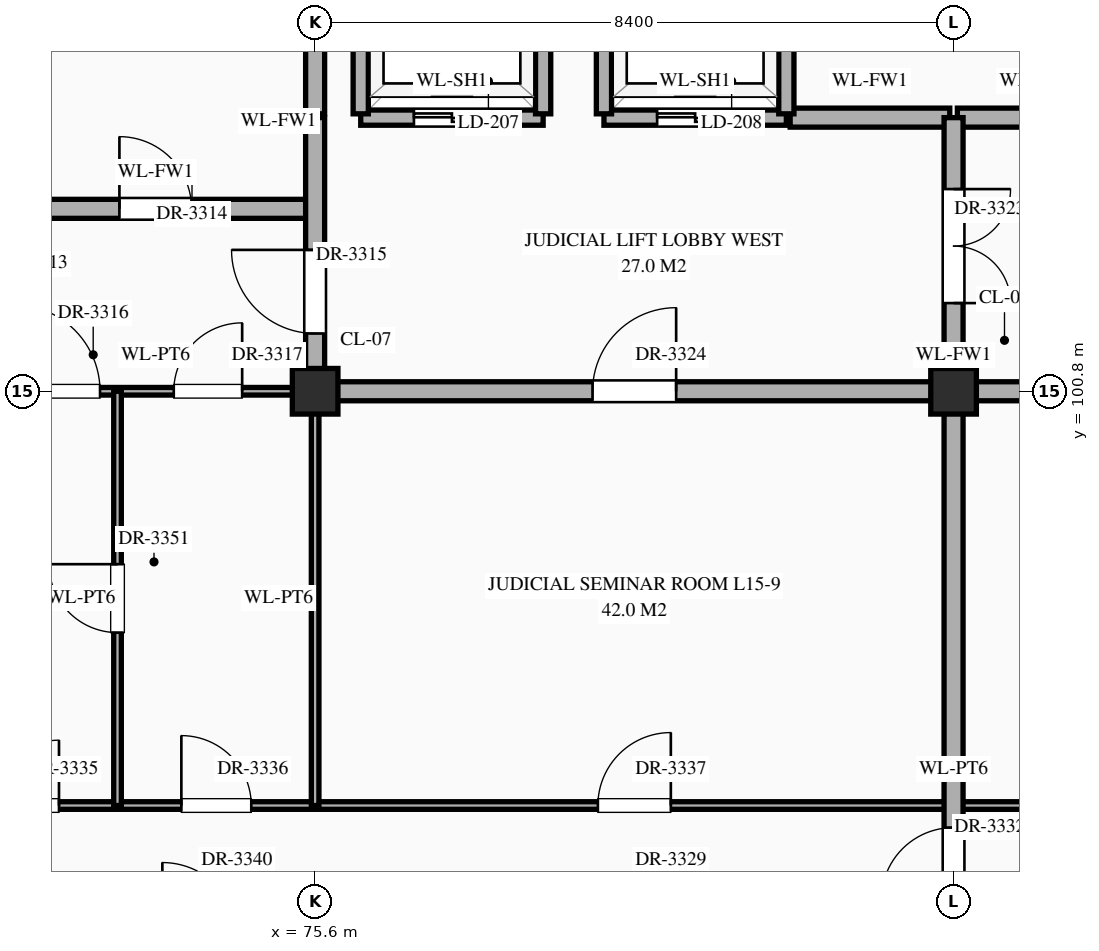
"""IFC4 building model, lengths in metres.
Left out: names, types, materials, properties, quantities, classifications, styles, units other than length and angle.
Written with IfcOpenShell. Run it as: python <this file> out.ifc"""

import sys

from ifc_helpers import new_model, si_unit, direction, frame, frame_2d, origin, origin_2d, place, context, subcontext, project, spatial, rectangle, extrude, element, fill, save


model = new_model("IFC4")
c1 = context("Model", 3, precision=1e-05, world=origin(), true_north=direction((0.0, 1.0)))
c2 = subcontext(c1, "Body", "Model", "MODEL_VIEW")
j1 = project(units=[si_unit("LENGTHUNIT", "METRE"), si_unit("PLANEANGLEUNIT", "RADIAN")], contexts=[c1])
p1 = place(None, origin())
s1 = spatial("IfcSite", under=j1, at=p1, CompositionType="ELEMENT")
p2 = place(p1, origin())
s2 = spatial("IfcBuilding", under=s1, at=p2, CompositionType="ELEMENT")
p3 = place(p2, frame((0.0, 0.0, 64.5)))
s3 = spatial("IfcBuildingStorey", under=s2, at=p3, CompositionType="ELEMENT", Elevation=64.5)
for number, where, z_axis, x_axis in (
    (1, (75.6, 100.8, 0.0), (0.0, 0.0, 1.0), (1.0, 0.0, 0.0)),
    (2, (84.0, 100.8, 0.0), (0.0, 0.0, 1.0), (1.0, 0.0, 0.0)),
):
    element("IfcColumn", number, at=place(p3, frame(where, z_axis=z_axis, x_axis=x_axis)), inside=s3, PredefinedType="COLUMN", context=c2, shape_type="SweptSolid", body=[
        extrude(rectangle(XDim=0.6, YDim=0.6, at=origin_2d()), origin(), (0.0, 0.0, 1.0), 4.2),
    ])
p4 = place(p3, frame((58.84, 95.35, 0.0), z_axis=(0.0, 0.0, 1.0), x_axis=(1.0, 0.0, 0.0)))
e3 = element("IfcWall", 3, at=p4, inside=s3, PredefinedType="STANDARD", context=c2, shape_type="SweptSolid", body=[
    extrude(rectangle(XDim=50.32, YDim=0.1, at=frame_2d((25.16, 0.0))), origin(), (0.0, 0.0, 1.0), 3.95),
])
p5 = place(p4, frame((3.61, 0.0, 0.0)))
e4 = element("IfcOpeningElement", 4, at=p5, cuts=e3, PredefinedType="OPENING", context=c2, shape_type="SweptSolid", body=[
    extrude(rectangle(XDim=1.14, YDim=2.4, at=frame_2d((0.57, 1.2))), frame((0.0, 0.062, 0.0), z_axis=(0.0, -1.0, 0.0), x_axis=(1.0, 0.0, 0.0)), (0.0, 0.0, 1.0), 0.124),
])
p6 = place(p4, frame((9.61, 0.0, 0.0)))
e5 = element("IfcOpeningElement", 5, at=p6, cuts=e3, PredefinedType="OPENING", context=c2, shape_type="SweptSolid", body=[
    extrude(rectangle(XDim=0.9, YDim=2.15, at=frame_2d((0.45, 1.075))), frame((0.0, 0.062, 0.0), z_axis=(0.0, -1.0, 0.0), x_axis=(1.0, 0.0, 0.0)), (0.0, 0.0, 1.0), 0.124),
])
p7 = place(p4, frame((12.53, 0.0, 0.0)))
e6 = element("IfcOpeningElement", 6, at=p7, cuts=e3, PredefinedType="OPENING", context=c2, shape_type="SweptSolid", body=[
    extrude(rectangle(XDim=0.86, YDim=2.1, at=frame_2d((0.43, 1.05))), frame((0.0, 0.062, 0.0), z_axis=(0.0, -1.0, 0.0), x_axis=(1.0, 0.0, 0.0)), (0.0, 0.0, 1.0), 0.124),
])
p8 = place(p4, frame((15.0, 0.0, 0.0)))
e7 = element("IfcOpeningElement", 7, at=p8, cuts=e3, PredefinedType="OPENING", context=c2, shape_type="SweptSolid", body=[
    extrude(rectangle(XDim=0.92, YDim=2.15, at=frame_2d((0.46, 1.075))), frame((0.0, 0.062, 0.0), z_axis=(0.0, -1.0, 0.0), x_axis=(1.0, 0.0, 0.0)), (0.0, 0.0, 1.0), 0.124),
])
p9 = place(p4, frame((20.48, 0.0, 0.0)))
e8 = element("IfcOpeningElement", 8, at=p9, cuts=e3, PredefinedType="OPENING", context=c2, shape_type="SweptSolid", body=[
    extrude(rectangle(XDim=0.96, YDim=2.2, at=frame_2d((0.48, 1.1))), frame((0.0, 0.062, 0.0), z_axis=(0.0, -1.0, 0.0), x_axis=(1.0, 0.0, 0.0)), (0.0, 0.0, 1.0), 0.124),
])
p10 = place(p4, frame((28.8, 0.0, 0.0)))
e9 = element("IfcOpeningElement", 9, at=p10, cuts=e3, PredefinedType="OPENING", context=c2, shape_type="SweptSolid", body=[
    extrude(rectangle(XDim=1.12, YDim=2.25, at=frame_2d((0.56, 1.125))), frame((0.0, 0.062, 0.0), z_axis=(0.0, -1.0, 0.0), x_axis=(1.0, 0.0, 0.0)), (0.0, 0.0, 1.0), 0.124),
])
p11 = place(p4, frame((34.68, 0.0, 0.0)))
e10 = element("IfcOpeningElement", 10, at=p11, cuts=e3, PredefinedType="OPENING", context=c2, shape_type="SweptSolid", body=[
    extrude(rectangle(XDim=1.16, YDim=2.3, at=frame_2d((0.58, 1.15))), frame((0.0, 0.062, 0.0), z_axis=(0.0, -1.0, 0.0), x_axis=(1.0, 0.0, 0.0)), (0.0, 0.0, 1.0), 0.124),
])
p12 = place(p4, frame((37.56, 0.0, 0.0)))
e11 = element("IfcOpeningElement", 11, at=p12, cuts=e3, PredefinedType="OPENING", context=c2, shape_type="SweptSolid", body=[
    extrude(rectangle(XDim=1.2, YDim=2.35, at=frame_2d((0.6, 1.175))), frame((0.0, 0.062, 0.0), z_axis=(0.0, -1.0, 0.0), x_axis=(1.0, 0.0, 0.0)), (0.0, 0.0, 1.0), 0.124),
])
p13 = place(p4, frame((40.04, 0.0, 0.0)))
e12 = element("IfcOpeningElement", 12, at=p13, cuts=e3, PredefinedType="OPENING", context=c2, shape_type="SweptSolid", body=[
    extrude(rectangle(XDim=1.24, YDim=2.3, at=frame_2d((0.62, 1.15))), frame((0.0, 0.062, 0.0), z_axis=(0.0, -1.0, 0.0), x_axis=(1.0, 0.0, 0.0)), (0.0, 0.0, 1.0), 0.124),
])
p14 = place(p4, frame((45.5, 0.0, 0.0)))
e13 = element("IfcOpeningElement", 13, at=p14, cuts=e3, PredefinedType="OPENING", context=c2, shape_type="SweptSolid", body=[
    extrude(rectangle(XDim=1.28, YDim=2.35, at=frame_2d((0.64, 1.175))), frame((0.0, 0.062, 0.0), z_axis=(0.0, -1.0, 0.0), x_axis=(1.0, 0.0, 0.0)), (0.0, 0.0, 1.0), 0.124),
])
p15 = place(p3, frame((71.4, 100.8, 0.0), z_axis=(0.0, 0.0, 1.0), x_axis=(1.0, 0.0, 0.0)))
e14 = element("IfcWall", 14, at=p15, inside=s3, PredefinedType="STANDARD", context=c2, shape_type="SweptSolid", body=[
    extrude(rectangle(XDim=4.2, YDim=0.1, at=frame_2d((2.1, 0.0))), origin(), (0.0, 0.0, 1.0), 3.1),
])
p16 = place(p15, frame((0.23, 0.0, 0.0)))
e15 = element("IfcOpeningElement", 15, at=p16, cuts=e14, PredefinedType="OPENING", context=c2, shape_type="SweptSolid", body=[
    extrude(rectangle(XDim=1.14, YDim=2.4, at=frame_2d((0.57, 1.2))), frame((0.0, 0.062, 0.0), z_axis=(0.0, -1.0, 0.0), x_axis=(1.0, 0.0, 0.0)), (0.0, 0.0, 1.0), 0.124),
])
p17 = place(p15, frame((2.34, 0.0, 0.0)))
e16 = element("IfcOpeningElement", 16, at=p17, cuts=e14, PredefinedType="OPENING", context=c2, shape_type="SweptSolid", body=[
    extrude(rectangle(XDim=0.9, YDim=2.15, at=frame_2d((0.45, 1.075))), frame((0.0, 0.062, 0.0), z_axis=(0.0, -1.0, 0.0), x_axis=(1.0, 0.0, 0.0)), (0.0, 0.0, 1.0), 0.124),
])
p18 = place(p3, frame((75.6, 100.8, 0.0), z_axis=(0.0, 0.0, 1.0), x_axis=(1.0, 0.0, 0.0)))
e17 = element("IfcWall", 17, at=p18, inside=s3, PredefinedType="STANDARD", context=c2, shape_type="SweptSolid", body=[
    extrude(rectangle(XDim=16.8, YDim=0.25, at=frame_2d((8.4, 0.0))), origin(), (0.0, 0.0, 1.0), 3.1),
])
p19 = place(p18, frame((3.65, 0.0, 0.0)))
e18 = element("IfcOpeningElement", 18, at=p19, cuts=e17, PredefinedType="OPENING", context=c2, shape_type="SweptSolid", body=[
    extrude(rectangle(XDim=1.1, YDim=2.2, at=frame_2d((0.55, 1.1))), frame((0.0, 0.137, 0.0), z_axis=(0.0, -1.0, 0.0), x_axis=(1.0, 0.0, 0.0)), (0.0, 0.0, 1.0), 0.274),
])
p20 = place(p18, frame((12.1, 0.0, 0.0)))
e19 = element("IfcOpeningElement", 19, at=p20, cuts=e17, PredefinedType="OPENING", context=c2, shape_type="SweptSolid", body=[
    extrude(rectangle(XDim=1.0, YDim=2.2, at=frame_2d((0.5, 1.1))), frame((0.0, 0.137, 0.0), z_axis=(0.0, -1.0, 0.0), x_axis=(1.0, 0.0, 0.0)), (0.0, 0.0, 1.0), 0.274),
])
p21 = place(p3, frame((71.4, 103.2, 0.0), z_axis=(0.0, 0.0, 1.0), x_axis=(1.0, 0.0, 0.0)))
e20 = element("IfcWall", 20, at=p21, inside=s3, PredefinedType="STANDARD", context=c2, shape_type="SweptSolid", body=[
    extrude(rectangle(XDim=4.2, YDim=0.25, at=frame_2d((2.1, 0.0))), origin(), (0.0, 0.0, 1.0), 3.95),
])
p22 = place(p21, frame((1.625, 0.0, 0.0)))
e21 = element("IfcOpeningElement", 21, at=p22, cuts=e20, PredefinedType="OPENING", context=c2, shape_type="SweptSolid", body=[
    extrude(rectangle(XDim=0.95, YDim=2.15, at=frame_2d((0.475, 1.075))), frame((0.0, 0.137, 0.0), z_axis=(0.0, -1.0, 0.0), x_axis=(1.0, 0.0, 0.0)), (0.0, 0.0, 1.0), 0.274),
])
p23 = place(p3, frame((76.2, 104.4, 0.0), z_axis=(0.0, 0.0, 1.0), x_axis=(1.0, 0.0, 0.0)))
e22 = element("IfcWall", 22, at=p23, inside=s3, PredefinedType="STANDARD", context=c2, shape_type="SweptSolid", body=[
    extrude(rectangle(XDim=2.4, YDim=0.2, at=frame_2d((1.2, 0.0))), origin(), (0.0, 0.0, 1.0), 3.95),
])
p24 = place(p23, frame((0.7, 0.0, 0.0)))
e23 = element("IfcOpeningElement", 23, at=p24, cuts=e22, PredefinedType="OPENING", context=c2, shape_type="SweptSolid", body=[
    extrude(rectangle(XDim=1.0, YDim=2.15, at=frame_2d((0.5, 1.075))), frame((0.0, 0.112, 0.0), z_axis=(0.0, -1.0, 0.0), x_axis=(1.0, 0.0, 0.0)), (0.0, 0.0, 1.0), 0.224),
])
p25 = place(p3, frame((79.4, 104.4, 0.0), z_axis=(0.0, 0.0, 1.0), x_axis=(1.0, 0.0, 0.0)))
e24 = element("IfcWall", 24, at=p25, inside=s3, PredefinedType="STANDARD", context=c2, shape_type="SweptSolid", body=[
    extrude(rectangle(XDim=2.4, YDim=0.2, at=frame_2d((1.2, 0.0))), origin(), (0.0, 0.0, 1.0), 3.95),
])
p26 = place(p25, frame((0.7, 0.0, 0.0)))
e25 = element("IfcOpeningElement", 25, at=p26, cuts=e24, PredefinedType="OPENING", context=c2, shape_type="SweptSolid", body=[
    extrude(rectangle(XDim=1.0, YDim=2.15, at=frame_2d((0.5, 1.075))), frame((0.0, 0.112, 0.0), z_axis=(0.0, -1.0, 0.0), x_axis=(1.0, 0.0, 0.0)), (0.0, 0.0, 1.0), 0.224),
])
for number, where, z_axis, x_axis in (
    (26, (81.85, 104.4, 0.0), (0.0, 0.0, 1.0), (1.0, 0.0, 0.0)),
    (27, (84.05, 104.4, 0.0), (0.0, 0.0, 1.0), (1.0, 0.0, 0.0)),
):
    element("IfcWall", number, at=place(p3, frame(where, z_axis=z_axis, x_axis=x_axis)), inside=s3, PredefinedType="STANDARD", context=c2, shape_type="SweptSolid", body=[
        extrude(rectangle(XDim=2.1, YDim=0.25, at=frame_2d((1.05, 0.0))), origin(), (0.0, 0.0, 1.0), 3.95),
    ])
p27 = place(p3, frame((73.0, 95.35, 0.0), z_axis=(0.0, 0.0, 1.0), x_axis=(0.0, 1.0, 0.0)))
e28 = element("IfcWall", 28, at=p27, inside=s3, PredefinedType="STANDARD", context=c2, shape_type="SweptSolid", body=[
    extrude(rectangle(XDim=5.45, YDim=0.1, at=frame_2d((2.725, 0.0))), origin(), (0.0, 0.0, 1.0), 3.95),
])
p28 = place(p27, frame((2.275, 0.0, 0.0)))
e29 = element("IfcOpeningElement", 29, at=p28, cuts=e28, PredefinedType="OPENING", context=c2, shape_type="SweptSolid", body=[
    extrude(rectangle(XDim=0.9, YDim=2.15, at=frame_2d((0.45, 1.075))), frame((0.0, 0.062, 0.0), z_axis=(0.0, -1.0, 0.0), x_axis=(1.0, 0.0, 0.0)), (0.0, 0.0, 1.0), 0.124),
])
p29 = place(p3, frame((75.6, 95.35, 0.0), z_axis=(0.0, 0.0, 1.0), x_axis=(0.0, 1.0, 0.0)))
e30 = element("IfcWall", 30, at=p29, inside=s3, PredefinedType="STANDARD", context=c2, shape_type="SweptSolid", body=[
    extrude(rectangle(XDim=5.45, YDim=0.1, at=frame_2d((2.725, 0.0))), origin(), (0.0, 0.0, 1.0), 3.2),
])
p30 = place(p3, frame((75.6, 100.8, 0.0), z_axis=(0.0, 0.0, 1.0), x_axis=(0.0, 1.0, 0.0)))
e31 = element("IfcWall", 31, at=p30, inside=s3, PredefinedType="STANDARD", context=c2, shape_type="SweptSolid", body=[
    extrude(rectangle(XDim=3.6, YDim=0.25, at=frame_2d((1.8, 0.0))), origin(), (0.0, 0.0, 1.0), 3.2),
])
p31 = place(p30, frame((0.76, 0.0, 0.0)))
e32 = element("IfcOpeningElement", 32, at=p31, cuts=e31, PredefinedType="OPENING", context=c2, shape_type="SweptSolid", body=[
    extrude(rectangle(XDim=1.1, YDim=2.2, at=frame_2d((0.55, 1.1))), frame((0.0, 0.137, 0.0), z_axis=(0.0, -1.0, 0.0), x_axis=(1.0, 0.0, 0.0)), (0.0, 0.0, 1.0), 0.274),
])
p32 = place(p3, frame((75.6, 104.45, 0.0), z_axis=(0.0, 0.0, 1.0), x_axis=(0.0, 1.0, 0.0)))
e33 = element("IfcWall", 33, at=p32, inside=s3, PredefinedType="STANDARD", context=c2, shape_type="SweptSolid", body=[
    extrude(rectangle(XDim=3.46, YDim=0.25, at=frame_2d((1.73, 0.0))), origin(), (0.0, 0.0, 1.0), 3.2),
])
for number, where, z_axis, x_axis in (
    (34, (76.2, 104.45, 0.0), (0.0, 0.0, 1.0), (0.0, 1.0, 0.0)),
    (35, (78.6, 104.45, 0.0), (0.0, 0.0, 1.0), (0.0, 1.0, 0.0)),
    (36, (79.4, 104.45, 0.0), (0.0, 0.0, 1.0), (0.0, 1.0, 0.0)),
    (37, (81.8, 104.45, 0.0), (0.0, 0.0, 1.0), (0.0, 1.0, 0.0)),
):
    element("IfcWall", number, at=place(p3, frame(where, z_axis=z_axis, x_axis=x_axis)), inside=s3, PredefinedType="STANDARD", context=c2, shape_type="SweptSolid", body=[
        extrude(rectangle(XDim=2.3, YDim=0.2, at=frame_2d((1.15, 0.0))), origin(), (0.0, 0.0, 1.0), 3.95),
    ])
p33 = place(p3, frame((84.0, 79.24, 0.0), z_axis=(0.0, 0.0, 1.0), x_axis=(0.0, 1.0, 0.0)))
e38 = element("IfcWall", 38, at=p33, inside=s3, PredefinedType="STANDARD", context=c2, shape_type="SweptSolid", body=[
    extrude(rectangle(XDim=25.16, YDim=0.25, at=frame_2d((12.58, 0.0))), origin(), (0.0, 0.0, 1.0), 3.1),
])
p34 = place(p33, frame((22.72, 0.0, 0.0)))
e39 = element("IfcOpeningElement", 39, at=p34, cuts=e38, PredefinedType="OPENING", context=c2, shape_type="SweptSolid", body=[
    extrude(rectangle(XDim=1.5, YDim=2.25, at=frame_2d((0.75, 1.125))), frame((0.0, 0.137, 0.0), z_axis=(0.0, -1.0, 0.0), x_axis=(1.0, 0.0, 0.0)), (0.0, 0.0, 1.0), 0.274),
])
p35 = place(p33, frame((12.55, 0.0, 0.0)))
e40 = element("IfcOpeningElement", 40, at=p35, cuts=e38, PredefinedType="OPENING", context=c2, shape_type="SweptSolid", body=[
    extrude(rectangle(XDim=1.0, YDim=2.2, at=frame_2d((0.5, 1.1))), frame((0.0, 0.137, 0.0), z_axis=(0.0, -1.0, 0.0), x_axis=(1.0, 0.0, 0.0)), (0.0, 0.0, 1.0), 0.274),
])
p36 = place(p33, frame((14.87, 0.0, 0.0)))
e41 = element("IfcOpeningElement", 41, at=p36, cuts=e38, PredefinedType="OPENING", context=c2, shape_type="SweptSolid", body=[
    extrude(rectangle(XDim=0.95, YDim=2.15, at=frame_2d((0.475, 1.075))), frame((0.0, 0.137, 0.0), z_axis=(0.0, -1.0, 0.0), x_axis=(1.0, 0.0, 0.0)), (0.0, 0.0, 1.0), 0.274),
])
p37 = place(p33, frame((5.7, 0.0, 0.0)))
e42 = element("IfcOpeningElement", 42, at=p37, cuts=e38, PredefinedType="OPENING", context=c2, shape_type="SweptSolid", body=[
    extrude(rectangle(XDim=0.95, YDim=2.15, at=frame_2d((0.475, 1.075))), frame((0.0, 0.137, 0.0), z_axis=(0.0, -1.0, 0.0), x_axis=(1.0, 0.0, 0.0)), (0.0, 0.0, 1.0), 0.274),
])
p38 = place(p24, origin())
e43 = element("IfcDoor", 43, at=p38, inside=s3, OperationType="DOUBLE_DOOR_SLIDING", PredefinedType="DOOR", context=c2, shape_type="SweptSolid", body=[
    extrude(rectangle(XDim=1.0, YDim=2.15, at=frame_2d((0.5, 1.075))), frame((0.0, 0.025, 0.0), z_axis=(0.0, -1.0, 0.0), x_axis=(1.0, 0.0, 0.0)), (0.0, 0.0, 1.0), 0.05),
])
fill(e23, e43)
p39 = place(p26, origin())
e44 = element("IfcDoor", 44, at=p39, inside=s3, OperationType="DOUBLE_DOOR_SLIDING", PredefinedType="DOOR", context=c2, shape_type="SweptSolid", body=[
    extrude(rectangle(XDim=1.0, YDim=2.15, at=frame_2d((0.5, 1.075))), frame((0.0, 0.025, 0.0), z_axis=(0.0, -1.0, 0.0), x_axis=(1.0, 0.0, 0.0)), (0.0, 0.0, 1.0), 0.05),
])
fill(e25, e44)
p40 = place(p22, origin())
e45 = element("IfcDoor", 45, at=p40, inside=s3, OperationType="SINGLE_SWING_LEFT", PredefinedType="DOOR", context=c2, shape_type="SweptSolid", body=[
    extrude(rectangle(XDim=0.95, YDim=2.15, at=frame_2d((0.475, 1.075))), frame((0.0, 0.025, 0.0), z_axis=(0.0, -1.0, 0.0), x_axis=(1.0, 0.0, 0.0)), (0.0, 0.0, 1.0), 0.05),
])
fill(e21, e45)
p41 = place(p31, origin())
e46 = element("IfcDoor", 46, at=p41, inside=s3, OperationType="SINGLE_SWING_RIGHT", PredefinedType="DOOR", context=c2, shape_type="SweptSolid", body=[
    extrude(rectangle(XDim=1.1, YDim=2.2, at=frame_2d((0.55, 1.1))), frame((0.0, 0.025, 0.0), z_axis=(0.0, -1.0, 0.0), x_axis=(1.0, 0.0, 0.0)), (0.0, 0.0, 1.0), 0.05),
])
fill(e32, e46)
p42 = place(p16, origin())
e47 = element("IfcDoor", 47, at=p42, inside=s3, OperationType="SINGLE_SWING_LEFT", PredefinedType="DOOR", context=c2, shape_type="SweptSolid", body=[
    extrude(rectangle(XDim=1.14, YDim=2.4, at=frame_2d((0.57, 1.2))), frame((0.0, 0.025, 0.0), z_axis=(0.0, -1.0, 0.0), x_axis=(1.0, 0.0, 0.0)), (0.0, 0.0, 1.0), 0.05),
])
fill(e15, e47)
p43 = place(p17, origin())
e48 = element("IfcDoor", 48, at=p43, inside=s3, OperationType="SINGLE_SWING_RIGHT", PredefinedType="DOOR", context=c2, shape_type="SweptSolid", body=[
    extrude(rectangle(XDim=0.9, YDim=2.15, at=frame_2d((0.45, 1.075))), frame((0.0, 0.025, 0.0), z_axis=(0.0, -1.0, 0.0), x_axis=(1.0, 0.0, 0.0)), (0.0, 0.0, 1.0), 0.05),
])
fill(e16, e48)
p44 = place(p34, frame((1.5, 0.0, 0.0), z_axis=(0.0, 0.0, 1.0), x_axis=(-1.0, 0.0, 0.0)))
e49 = element("IfcDoor", 49, at=p44, inside=s3, OperationType="DOUBLE_DOOR_SINGLE_SWING", PredefinedType="DOOR", context=c2, shape_type="SweptSolid", body=[
    extrude(rectangle(XDim=1.5, YDim=2.25, at=frame_2d((0.75, 1.125))), frame((0.0, 0.025, 0.0), z_axis=(0.0, -1.0, 0.0), x_axis=(1.0, 0.0, 0.0)), (0.0, 0.0, 1.0), 0.05),
])
fill(e39, e49)
p45 = place(p19, origin())
e50 = element("IfcDoor", 50, at=p45, inside=s3, OperationType="SINGLE_SWING_RIGHT", PredefinedType="DOOR", context=c2, shape_type="SweptSolid", body=[
    extrude(rectangle(XDim=1.1, YDim=2.2, at=frame_2d((0.55, 1.1))), frame((0.0, 0.025, 0.0), z_axis=(0.0, -1.0, 0.0), x_axis=(1.0, 0.0, 0.0)), (0.0, 0.0, 1.0), 0.05),
])
fill(e18, e50)
p46 = place(p36, origin())
e51 = element("IfcDoor", 51, at=p46, inside=s3, OperationType="SINGLE_SWING_LEFT", PredefinedType="DOOR", context=c2, shape_type="SweptSolid", body=[
    extrude(rectangle(XDim=0.95, YDim=2.15, at=frame_2d((0.475, 1.075))), frame((0.0, 0.025, 0.0), z_axis=(0.0, -1.0, 0.0), x_axis=(1.0, 0.0, 0.0)), (0.0, 0.0, 1.0), 0.05),
])
fill(e41, e51)
p47 = place(p7, origin())
e52 = element("IfcDoor", 52, at=p47, inside=s3, OperationType="SINGLE_SWING_RIGHT", PredefinedType="DOOR", context=c2, shape_type="SweptSolid", body=[
    extrude(rectangle(XDim=0.86, YDim=2.1, at=frame_2d((0.43, 1.05))), frame((0.0, 0.025, 0.0), z_axis=(0.0, -1.0, 0.0), x_axis=(1.0, 0.0, 0.0)), (0.0, 0.0, 1.0), 0.05),
])
fill(e6, e52)
p48 = place(p8, origin())
e53 = element("IfcDoor", 53, at=p48, inside=s3, OperationType="SINGLE_SWING_LEFT", PredefinedType="DOOR", context=c2, shape_type="SweptSolid", body=[
    extrude(rectangle(XDim=0.92, YDim=2.15, at=frame_2d((0.46, 1.075))), frame((0.0, 0.025, 0.0), z_axis=(0.0, -1.0, 0.0), x_axis=(1.0, 0.0, 0.0)), (0.0, 0.0, 1.0), 0.05),
])
fill(e7, e53)
p49 = place(p9, origin())
e54 = element("IfcDoor", 54, at=p49, inside=s3, OperationType="SINGLE_SWING_RIGHT", PredefinedType="DOOR", context=c2, shape_type="SweptSolid", body=[
    extrude(rectangle(XDim=0.96, YDim=2.2, at=frame_2d((0.48, 1.1))), frame((0.0, 0.025, 0.0), z_axis=(0.0, -1.0, 0.0), x_axis=(1.0, 0.0, 0.0)), (0.0, 0.0, 1.0), 0.05),
])
fill(e8, e54)
p50 = place(p28, origin())
e55 = element("IfcDoor", 55, at=p50, inside=s3, OperationType="SINGLE_SWING_RIGHT", PredefinedType="DOOR", context=c2, shape_type="SweptSolid", body=[
    extrude(rectangle(XDim=0.9, YDim=2.15, at=frame_2d((0.45, 1.075))), frame((0.0, 0.025, 0.0), z_axis=(0.0, -1.0, 0.0), x_axis=(1.0, 0.0, 0.0)), (0.0, 0.0, 1.0), 0.05),
])
fill(e29, e55)
save(model, sys.argv[1])
